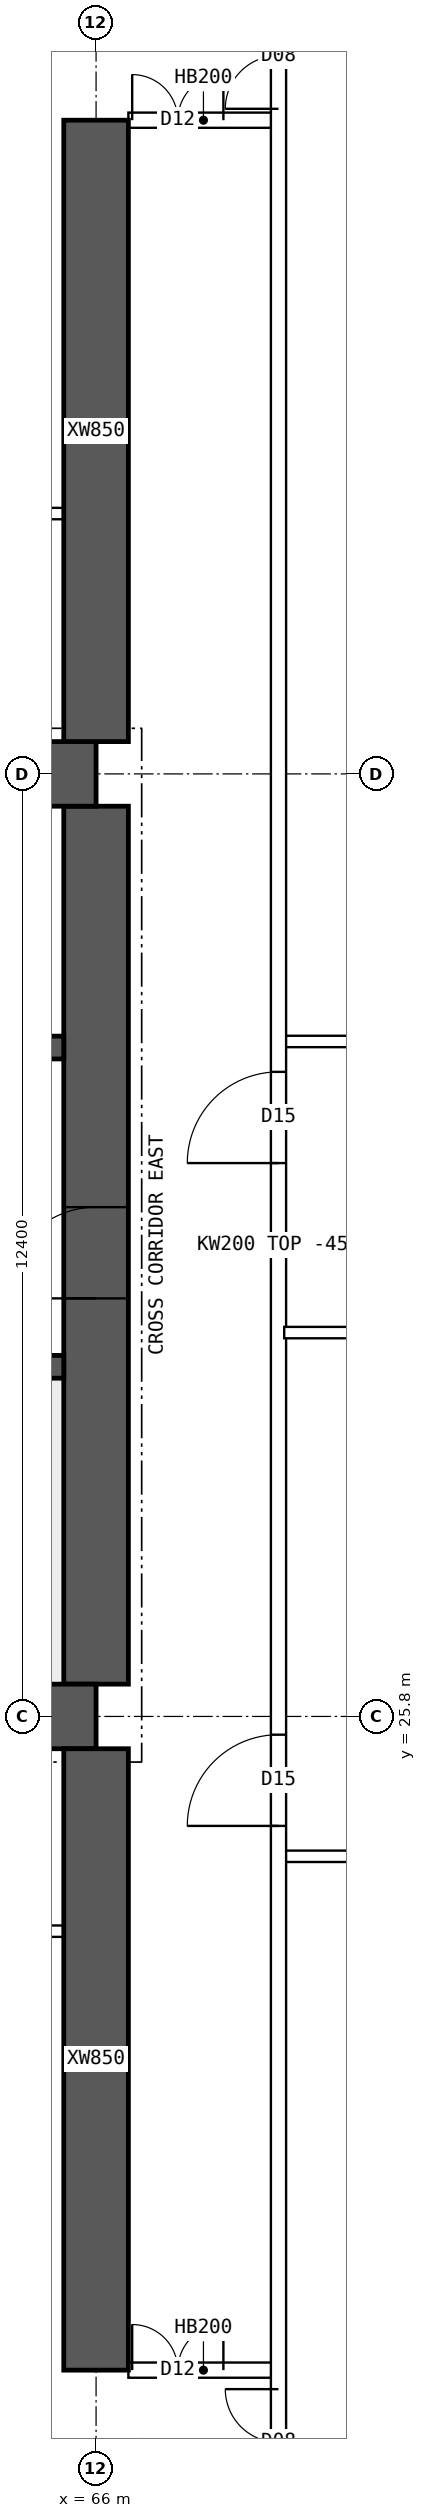
"""IFC4 building model, lengths in metres.
Left out: names, types, materials, properties, quantities, classifications, styles, units other than length and angle.
Written with IfcOpenShell. Run it as: python <this file> out.ifc"""

import sys

from ifc_helpers import new_model, si_unit, direction, frame, frame_2d, origin, place, context, subcontext, project, spatial, polyline, rectangle, outline, extrude, element, fill, save


model = new_model("IFC4")
c1 = context("Model", 3, precision=1e-05, world=origin(), true_north=direction((0.0, 1.0)))
c2 = subcontext(c1, "Body", "Model", "MODEL_VIEW")
j1 = project(units=[si_unit("LENGTHUNIT", "METRE"), si_unit("PLANEANGLEUNIT", "RADIAN")], contexts=[c1])
p1 = place(None, origin())
s1 = spatial("IfcSite", under=j1, at=p1, CompositionType="ELEMENT")
p2 = place(p1, origin())
s2 = spatial("IfcBuilding", under=s1, at=p2, CompositionType="ELEMENT")
p3 = place(p2, frame((0.0, 0.0, 159.85)))
s3 = spatial("IfcBuildingStorey", under=s2, at=p3, CompositionType="ELEMENT", Elevation=159.85)
for number, where, z_axis, x_axis in (
    (1, (18.0, 25.8, 0.0), (0.0, 0.0, 1.0), (1.0, 0.0, 0.0)),
    (2, (18.0, 38.2, 0.0), (0.0, 0.0, 1.0), (1.0, 0.0, 0.0)),
):
    element("IfcWall", number, at=place(p3, frame(where, z_axis=z_axis, x_axis=x_axis)), inside=s3, PredefinedType="SHEAR", context=c2, shape_type="SweptSolid", body=[
        extrude(rectangle(XDim=48.0, YDim=0.85, at=frame_2d((24.0, 0.0))), origin(), (0.0, 0.0, 1.0), 3.75),
    ])
p4 = place(p3, frame((66.0, 26.225, 0.0), z_axis=(0.0, 0.0, 1.0), x_axis=(0.0, 1.0, 0.0)))
e3 = element("IfcWall", 3, at=p4, inside=s3, PredefinedType="SHEAR", context=c2, shape_type="SweptSolid", body=[
    extrude(rectangle(XDim=11.55, YDim=0.85, at=frame_2d((5.775, 0.0))), origin(), (0.0, 0.0, 1.0), 3.75),
])
p5 = place(p4, frame((5.075, 0.0, 0.0)))
e4 = element("IfcOpeningElement", 4, at=p5, cuts=e3, PredefinedType="OPENING", context=c2, shape_type="SweptSolid", body=[
    extrude(rectangle(XDim=1.2, YDim=2.1, at=frame_2d((0.6, 1.05))), frame((0.0, 0.435, 0.0), z_axis=(0.0, -1.0, 0.0), x_axis=(1.0, 0.0, 0.0)), (0.0, 0.0, 1.0), 0.87),
])
p6 = place(p3, frame((18.425, 30.4, 0.0), z_axis=(0.0, 0.0, 1.0), x_axis=(1.0, 0.0, 0.0)))
e5 = element("IfcWall", 5, at=p6, inside=s3, PredefinedType="SHEAR", context=c2, shape_type="SweptSolid", body=[
    extrude(rectangle(XDim=47.15, YDim=0.3, at=frame_2d((23.575, 0.0))), origin(), (0.0, 0.0, 1.0), 3.75),
])
p7 = place(p6, frame((0.4, 0.0, 0.0)))
e6 = element("IfcOpeningElement", 6, at=p7, cuts=e5, PredefinedType="OPENING", context=c2, shape_type="SweptSolid", body=[
    extrude(rectangle(XDim=1.0, YDim=2.1, at=frame_2d((0.5, 1.05))), frame((0.0, 0.16, 0.0), z_axis=(0.0, -1.0, 0.0), x_axis=(1.0, 0.0, 0.0)), (0.0, 0.0, 1.0), 0.32),
])
p8 = place(p6, frame((45.75, 0.0, 0.0)))
e7 = element("IfcOpeningElement", 7, at=p8, cuts=e5, PredefinedType="OPENING", context=c2, shape_type="SweptSolid", body=[
    extrude(rectangle(XDim=1.0, YDim=2.1, at=frame_2d((0.5, 1.05))), frame((0.0, 0.16, 0.0), z_axis=(0.0, -1.0, 0.0), x_axis=(1.0, 0.0, 0.0)), (0.0, 0.0, 1.0), 0.32),
])
p9 = place(p6, frame((8.325, 0.0, 0.0)))
e8 = element("IfcOpeningElement", 8, at=p9, cuts=e5, PredefinedType="OPENING", context=c2, shape_type="SweptSolid", body=[
    extrude(rectangle(XDim=1.1, YDim=2.1, at=frame_2d((0.55, 1.05))), frame((0.0, 0.16, 0.0), z_axis=(0.0, -1.0, 0.0), x_axis=(1.0, 0.0, 0.0)), (0.0, 0.0, 1.0), 0.32),
])
p10 = place(p6, frame((10.925, 0.0, 0.0)))
e9 = element("IfcOpeningElement", 9, at=p10, cuts=e5, PredefinedType="OPENING", context=c2, shape_type="SweptSolid", body=[
    extrude(rectangle(XDim=1.1, YDim=2.1, at=frame_2d((0.55, 1.05))), frame((0.0, 0.16, 0.0), z_axis=(0.0, -1.0, 0.0), x_axis=(1.0, 0.0, 0.0)), (0.0, 0.0, 1.0), 0.32),
])
p11 = place(p6, frame((13.525, 0.0, 0.0)))
e10 = element("IfcOpeningElement", 10, at=p11, cuts=e5, PredefinedType="OPENING", context=c2, shape_type="SweptSolid", body=[
    extrude(rectangle(XDim=1.1, YDim=2.1, at=frame_2d((0.55, 1.05))), frame((0.0, 0.16, 0.0), z_axis=(0.0, -1.0, 0.0), x_axis=(1.0, 0.0, 0.0)), (0.0, 0.0, 1.0), 0.32),
])
p12 = place(p6, frame((16.125, 0.0, 0.0)))
e11 = element("IfcOpeningElement", 11, at=p12, cuts=e5, PredefinedType="OPENING", context=c2, shape_type="SweptSolid", body=[
    extrude(rectangle(XDim=1.1, YDim=2.1, at=frame_2d((0.55, 1.05))), frame((0.0, 0.16, 0.0), z_axis=(0.0, -1.0, 0.0), x_axis=(1.0, 0.0, 0.0)), (0.0, 0.0, 1.0), 0.32),
])
p13 = place(p6, frame((18.9, 0.0, 0.0)))
e12 = element("IfcOpeningElement", 12, at=p13, cuts=e5, PredefinedType="OPENING", context=c2, shape_type="SweptSolid", body=[
    extrude(rectangle(XDim=0.9, YDim=2.1, at=frame_2d((0.45, 1.05))), frame((0.0, 0.16, 0.0), z_axis=(0.0, -1.0, 0.0), x_axis=(1.0, 0.0, 0.0)), (0.0, 0.0, 1.0), 0.32),
])
p14 = place(p6, frame((30.192, 0.0, 0.0)))
e13 = element("IfcOpeningElement", 13, at=p14, cuts=e5, PredefinedType="OPENING", context=c2, shape_type="SweptSolid", body=[
    extrude(rectangle(XDim=1.1, YDim=2.1, at=frame_2d((0.55, 1.05))), frame((0.0, 0.16, 0.0), z_axis=(0.0, -1.0, 0.0), x_axis=(1.0, 0.0, 0.0)), (0.0, 0.0, 1.0), 0.32),
])
p15 = place(p6, frame((33.725, 0.0, 0.0)))
e14 = element("IfcOpeningElement", 14, at=p15, cuts=e5, PredefinedType="OPENING", context=c2, shape_type="SweptSolid", body=[
    extrude(rectangle(XDim=1.1, YDim=2.1, at=frame_2d((0.55, 1.05))), frame((0.0, 0.16, 0.0), z_axis=(0.0, -1.0, 0.0), x_axis=(1.0, 0.0, 0.0)), (0.0, 0.0, 1.0), 0.32),
])
p16 = place(p6, frame((37.258, 0.0, 0.0)))
e15 = element("IfcOpeningElement", 15, at=p16, cuts=e5, PredefinedType="OPENING", context=c2, shape_type="SweptSolid", body=[
    extrude(rectangle(XDim=1.1, YDim=2.1, at=frame_2d((0.55, 1.05))), frame((0.0, 0.16, 0.0), z_axis=(0.0, -1.0, 0.0), x_axis=(1.0, 0.0, 0.0)), (0.0, 0.0, 1.0), 0.32),
])
p17 = place(p3, frame((18.425, 34.6, 0.0), z_axis=(0.0, 0.0, 1.0), x_axis=(1.0, 0.0, 0.0)))
e16 = element("IfcWall", 16, at=p17, inside=s3, PredefinedType="SHEAR", context=c2, shape_type="SweptSolid", body=[
    extrude(rectangle(XDim=47.15, YDim=0.3, at=frame_2d((23.575, 0.0))), origin(), (0.0, 0.0, 1.0), 3.75),
])
p18 = place(p17, frame((0.9, 0.0, 0.0)))
e17 = element("IfcOpeningElement", 17, at=p18, cuts=e16, PredefinedType="OPENING", context=c2, shape_type="SweptSolid", body=[
    extrude(rectangle(XDim=1.1, YDim=2.1, at=frame_2d((0.55, 1.05))), frame((0.0, 0.16, 0.0), z_axis=(0.0, -1.0, 0.0), x_axis=(1.0, 0.0, 0.0)), (0.0, 0.0, 1.0), 0.32),
])
p19 = place(p17, frame((45.15, 0.0, 0.0)))
e18 = element("IfcOpeningElement", 18, at=p19, cuts=e16, PredefinedType="OPENING", context=c2, shape_type="SweptSolid", body=[
    extrude(rectangle(XDim=1.1, YDim=2.1, at=frame_2d((0.55, 1.05))), frame((0.0, 0.16, 0.0), z_axis=(0.0, -1.0, 0.0), x_axis=(1.0, 0.0, 0.0)), (0.0, 0.0, 1.0), 0.32),
])
p20 = place(p17, frame((4.175, 0.0, 0.0)))
e19 = element("IfcOpeningElement", 19, at=p20, cuts=e16, PredefinedType="OPENING", context=c2, shape_type="SweptSolid", body=[
    extrude(rectangle(XDim=0.9, YDim=2.1, at=frame_2d((0.45, 1.05))), frame((0.0, 0.16, 0.0), z_axis=(0.0, -1.0, 0.0), x_axis=(1.0, 0.0, 0.0)), (0.0, 0.0, 1.0), 0.32),
])
p21 = place(p17, frame((42.075, 0.0, 0.0)))
e20 = element("IfcOpeningElement", 20, at=p21, cuts=e16, PredefinedType="OPENING", context=c2, shape_type="SweptSolid", body=[
    extrude(rectangle(XDim=0.9, YDim=2.1, at=frame_2d((0.45, 1.05))), frame((0.0, 0.16, 0.0), z_axis=(0.0, -1.0, 0.0), x_axis=(1.0, 0.0, 0.0)), (0.0, 0.0, 1.0), 0.32),
])
p22 = place(p17, frame((8.95, 0.0, 0.0)))
e21 = element("IfcOpeningElement", 21, at=p22, cuts=e16, PredefinedType="OPENING", context=c2, shape_type="SweptSolid", body=[
    extrude(rectangle(XDim=0.9, YDim=2.1, at=frame_2d((0.45, 1.05))), frame((0.0, 0.16, 0.0), z_axis=(0.0, -1.0, 0.0), x_axis=(1.0, 0.0, 0.0)), (0.0, 0.0, 1.0), 0.32),
])
p23 = place(p17, frame((12.924, 0.0, 0.0)))
e22 = element("IfcOpeningElement", 22, at=p23, cuts=e16, PredefinedType="OPENING", context=c2, shape_type="SweptSolid", body=[
    extrude(rectangle(XDim=0.9, YDim=2.1, at=frame_2d((0.45, 1.05))), frame((0.0, 0.16, 0.0), z_axis=(0.0, -1.0, 0.0), x_axis=(1.0, 0.0, 0.0)), (0.0, 0.0, 1.0), 0.32),
])
p24 = place(p17, frame((16.571, 0.0, 0.0)))
e23 = element("IfcOpeningElement", 23, at=p24, cuts=e16, PredefinedType="OPENING", context=c2, shape_type="SweptSolid", body=[
    extrude(rectangle(XDim=0.9, YDim=2.1, at=frame_2d((0.45, 1.05))), frame((0.0, 0.16, 0.0), z_axis=(0.0, -1.0, 0.0), x_axis=(1.0, 0.0, 0.0)), (0.0, 0.0, 1.0), 0.32),
])
p25 = place(p17, frame((20.33, 0.0, 0.0)))
e24 = element("IfcOpeningElement", 24, at=p25, cuts=e16, PredefinedType="OPENING", context=c2, shape_type="SweptSolid", body=[
    extrude(rectangle(XDim=0.9, YDim=2.1, at=frame_2d((0.45, 1.05))), frame((0.0, 0.16, 0.0), z_axis=(0.0, -1.0, 0.0), x_axis=(1.0, 0.0, 0.0)), (0.0, 0.0, 1.0), 0.32),
])
p26 = place(p17, frame((24.736, 0.0, 0.0)))
e25 = element("IfcOpeningElement", 25, at=p26, cuts=e16, PredefinedType="OPENING", context=c2, shape_type="SweptSolid", body=[
    extrude(rectangle(XDim=0.9, YDim=2.1, at=frame_2d((0.45, 1.05))), frame((0.0, 0.16, 0.0), z_axis=(0.0, -1.0, 0.0), x_axis=(1.0, 0.0, 0.0)), (0.0, 0.0, 1.0), 0.32),
])
p27 = place(p17, frame((27.533, 0.0, 0.0)))
e26 = element("IfcOpeningElement", 26, at=p27, cuts=e16, PredefinedType="OPENING", context=c2, shape_type="SweptSolid", body=[
    extrude(rectangle(XDim=0.9, YDim=2.1, at=frame_2d((0.45, 1.05))), frame((0.0, 0.16, 0.0), z_axis=(0.0, -1.0, 0.0), x_axis=(1.0, 0.0, 0.0)), (0.0, 0.0, 1.0), 0.32),
])
p28 = place(p17, frame((29.906, 0.0, 0.0)))
e27 = element("IfcOpeningElement", 27, at=p28, cuts=e16, PredefinedType="OPENING", context=c2, shape_type="SweptSolid", body=[
    extrude(rectangle(XDim=0.9, YDim=2.1, at=frame_2d((0.45, 1.05))), frame((0.0, 0.16, 0.0), z_axis=(0.0, -1.0, 0.0), x_axis=(1.0, 0.0, 0.0)), (0.0, 0.0, 1.0), 0.32),
])
p29 = place(p17, frame((35.376, 0.0, 0.0)))
e28 = element("IfcOpeningElement", 28, at=p29, cuts=e16, PredefinedType="OPENING", context=c2, shape_type="SweptSolid", body=[
    extrude(rectangle(XDim=0.9, YDim=2.1, at=frame_2d((0.45, 1.05))), frame((0.0, 0.16, 0.0), z_axis=(0.0, -1.0, 0.0), x_axis=(1.0, 0.0, 0.0)), (0.0, 0.0, 1.0), 0.32),
])
for number, where, z_axis, x_axis in (
    (29, (66.0, 17.2, 0.0), (0.0, 0.0, 1.0), (0.0, 1.0, 0.0)),
    (30, (66.0, 38.625, 0.0), (0.0, 0.0, 1.0), (0.0, 1.0, 0.0)),
):
    element("IfcWall", number, at=place(p3, frame(where, z_axis=z_axis, x_axis=x_axis)), inside=s3, PredefinedType="SHEAR", context=c2, shape_type="SweptSolid", body=[
        extrude(rectangle(XDim=8.175, YDim=0.85, at=frame_2d((4.087, 0.0))), origin(), (0.0, 0.0, 1.0), 3.75),
    ])
p30 = place(p3, frame((66.425, 17.2, 0.0), z_axis=(0.0, 0.0, 1.0), x_axis=(1.0, 0.0, 0.0)))
e31 = element("IfcWall", 31, at=p30, inside=s3, PredefinedType="SOLIDWALL", context=c2, shape_type="SweptSolid", body=[
    extrude(rectangle(XDim=1.975, YDim=0.2, at=frame_2d((0.987, 0.0))), origin(), (0.0, 0.0, 1.0), 3.3),
])
p31 = place(p30, frame((0.05, 0.0, 0.0)))
e32 = element("IfcOpeningElement", 32, at=p31, cuts=e31, PredefinedType="OPENING", context=c2, shape_type="SweptSolid", body=[
    extrude(rectangle(XDim=1.2, YDim=2.1, at=frame_2d((0.6, 1.05))), frame((0.0, 0.11, 0.0), z_axis=(0.0, -1.0, 0.0), x_axis=(1.0, 0.0, 0.0)), (0.0, 0.0, 1.0), 0.22),
])
p32 = place(p3, frame((66.425, 46.8, 0.0), z_axis=(0.0, 0.0, 1.0), x_axis=(1.0, 0.0, 0.0)))
e33 = element("IfcWall", 33, at=p32, inside=s3, PredefinedType="SOLIDWALL", context=c2, shape_type="SweptSolid", body=[
    extrude(rectangle(XDim=1.975, YDim=0.2, at=frame_2d((0.987, 0.0))), origin(), (0.0, 0.0, 1.0), 3.3),
])
p33 = place(p32, frame((0.05, 0.0, 0.0)))
e34 = element("IfcOpeningElement", 34, at=p33, cuts=e33, PredefinedType="OPENING", context=c2, shape_type="SweptSolid", body=[
    extrude(rectangle(XDim=1.2, YDim=2.1, at=frame_2d((0.6, 1.05))), frame((0.0, 0.11, 0.0), z_axis=(0.0, -1.0, 0.0), x_axis=(1.0, 0.0, 0.0)), (0.0, 0.0, 1.0), 0.22),
])
p34 = place(p3, frame((60.075, 22.975, 0.0), z_axis=(0.0, 0.0, 1.0), x_axis=(1.0, 0.0, 0.0)))
e35 = element("IfcWall", 35, at=p34, inside=s3, PredefinedType="PARTITIONING", context=c2, shape_type="SweptSolid", body=[
    extrude(rectangle(XDim=5.5, YDim=0.15, at=frame_2d((2.75, 0.0))), origin(), (0.0, 0.0, 1.0), 3.3),
])
p35 = place(p34, frame((0.4, 0.0, 0.0)))
e36 = element("IfcOpeningElement", 36, at=p35, cuts=e35, PredefinedType="OPENING", context=c2, shape_type="SweptSolid", body=[
    extrude(rectangle(XDim=1.0, YDim=2.1, at=frame_2d((0.5, 1.05))), frame((0.0, 0.085, 0.0), z_axis=(0.0, -1.0, 0.0), x_axis=(1.0, 0.0, 0.0)), (0.0, 0.0, 1.0), 0.17),
])
p36 = place(p3, frame((65.575, 41.625, 0.0), z_axis=(0.0, 0.0, 1.0), x_axis=(-1.0, 0.0, 0.0)))
e37 = element("IfcWall", 37, at=p36, inside=s3, PredefinedType="PARTITIONING", context=c2, shape_type="SweptSolid", body=[
    extrude(rectangle(XDim=5.5, YDim=0.15, at=frame_2d((2.75, 0.0))), origin(), (0.0, 0.0, 1.0), 3.3),
])
p37 = place(p36, frame((0.4, 0.0, 0.0)))
e38 = element("IfcOpeningElement", 38, at=p37, cuts=e37, PredefinedType="OPENING", context=c2, shape_type="SweptSolid", body=[
    extrude(rectangle(XDim=1.0, YDim=2.1, at=frame_2d((0.5, 1.05))), frame((0.0, 0.085, 0.0), z_axis=(0.0, -1.0, 0.0), x_axis=(1.0, 0.0, 0.0)), (0.0, 0.0, 1.0), 0.17),
])
p38 = place(p3, frame((68.475, 30.85, 0.0), z_axis=(0.0, 0.0, 1.0), x_axis=(1.0, 0.0, 0.0)))
e39 = element("IfcWall", 39, at=p38, inside=s3, PredefinedType="PARTITIONING", context=c2, shape_type="SweptSolid", body=[
    extrude(outline(polyline([(0.0, 0.0), (6.82, 0.0), (6.82, 3.3), (3.827, 3.3), (3.825, 2.85), (3.227, 2.85), (3.225, 3.3), (0.0, 3.3), (0.0, 0.0)])), frame((0.0, 0.075, 0.0), z_axis=(0.0, -1.0, 0.0), x_axis=(1.0, 0.0, 0.0)), (0.0, 0.0, 1.0), 0.15),
])
p39 = place(p3, frame((68.4, 10.446, 0.0), z_axis=(0.0, 0.0, 1.0), x_axis=(0.0, 1.0, 0.0)))
e40 = element("IfcWall", 40, at=p39, inside=s3, PredefinedType="SOLIDWALL", context=c2, shape_type="SweptSolid", body=[
    extrude(rectangle(XDim=43.107, YDim=0.2, at=frame_2d((21.554, 0.0))), origin(), (0.0, 0.0, 1.0), 3.3),
])
p40 = place(p39, frame((13.914, 0.0, 0.0)))
e41 = element("IfcOpeningElement", 41, at=p40, cuts=e40, PredefinedType="OPENING", context=c2, shape_type="SweptSolid", body=[
    extrude(rectangle(XDim=1.2, YDim=2.1, at=frame_2d((0.6, 1.05))), frame((0.0, 0.11, 0.0), z_axis=(0.0, -1.0, 0.0), x_axis=(1.0, 0.0, 0.0)), (0.0, 0.0, 1.0), 0.22),
])
p41 = place(p39, frame((22.634, 0.0, 0.0)))
e42 = element("IfcOpeningElement", 42, at=p41, cuts=e40, PredefinedType="OPENING", context=c2, shape_type="SweptSolid", body=[
    extrude(rectangle(XDim=1.2, YDim=2.1, at=frame_2d((0.6, 1.05))), frame((0.0, 0.11, 0.0), z_axis=(0.0, -1.0, 0.0), x_axis=(1.0, 0.0, 0.0)), (0.0, 0.0, 1.0), 0.22),
])
p42 = place(p39, frame((5.104, 0.0, 0.0)))
e43 = element("IfcOpeningElement", 43, at=p42, cuts=e40, PredefinedType="OPENING", context=c2, shape_type="SweptSolid", body=[
    extrude(rectangle(XDim=1.4, YDim=2.1, at=frame_2d((0.7, 1.05))), frame((0.0, 0.11, 0.0), z_axis=(0.0, -1.0, 0.0), x_axis=(1.0, 0.0, 0.0)), (0.0, 0.0, 1.0), 0.22),
])
p43 = place(p39, frame((36.504, 0.0, 0.0)))
e44 = element("IfcOpeningElement", 44, at=p43, cuts=e40, PredefinedType="OPENING", context=c2, shape_type="SweptSolid", body=[
    extrude(rectangle(XDim=1.4, YDim=2.1, at=frame_2d((0.7, 1.05))), frame((0.0, 0.11, 0.0), z_axis=(0.0, -1.0, 0.0), x_axis=(1.0, 0.0, 0.0)), (0.0, 0.0, 1.0), 0.22),
])
p44 = place(p3, frame((68.475, 23.96, 0.0), z_axis=(0.0, 0.0, 1.0), x_axis=(1.0, 0.0, 0.0)))
e45 = element("IfcWall", 45, at=p44, inside=s3, PredefinedType="PARTITIONING", context=c2, shape_type="SweptSolid", body=[
    extrude(rectangle(XDim=6.82, YDim=0.15, at=frame_2d((3.41, 0.0))), origin(), (0.0, 0.0, 1.0), 3.3),
])
p45 = place(p3, frame((68.475, 34.68, 0.0), z_axis=(0.0, 0.0, 1.0), x_axis=(1.0, 0.0, 0.0)))
e46 = element("IfcWall", 46, at=p45, inside=s3, PredefinedType="PARTITIONING", context=c2, shape_type="SweptSolid", body=[
    extrude(outline(polyline([(0.0, 0.0), (6.82, 0.0), (6.82, 3.3), (3.827, 3.3), (3.825, 2.85), (3.227, 2.85), (3.225, 3.3), (0.0, 3.3), (0.0, 0.0)])), frame((0.0, 0.075, 0.0), z_axis=(0.0, -1.0, 0.0), x_axis=(1.0, 0.0, 0.0)), (0.0, 0.0, 1.0), 0.15),
])
p46 = place(p5, origin())
e47 = element("IfcDoor", 47, at=p46, inside=s3, OperationType="SINGLE_SWING_LEFT", PredefinedType="DOOR", context=c2, shape_type="SweptSolid", body=[
    extrude(rectangle(XDim=1.2, YDim=2.1, at=frame_2d((0.6, 1.05))), frame((0.0, 0.025, 0.0), z_axis=(0.0, -1.0, 0.0), x_axis=(1.0, 0.0, 0.0)), (0.0, 0.0, 1.0), 0.05),
])
fill(e4, e47)
p47 = place(p31, origin())
e48 = element("IfcDoor", 48, at=p47, inside=s3, OperationType="DOUBLE_DOOR_SINGLE_SWING", PredefinedType="DOOR", context=c2, shape_type="SweptSolid", body=[
    extrude(rectangle(XDim=1.2, YDim=2.1, at=frame_2d((0.6, 1.05))), frame((0.0, 0.025, 0.0), z_axis=(0.0, -1.0, 0.0), x_axis=(1.0, 0.0, 0.0)), (0.0, 0.0, 1.0), 0.05),
])
fill(e32, e48)
p48 = place(p33, origin())
e49 = element("IfcDoor", 49, at=p48, inside=s3, OperationType="DOUBLE_DOOR_SINGLE_SWING", PredefinedType="DOOR", context=c2, shape_type="SweptSolid", body=[
    extrude(rectangle(XDim=1.2, YDim=2.1, at=frame_2d((0.6, 1.05))), frame((0.0, 0.025, 0.0), z_axis=(0.0, -1.0, 0.0), x_axis=(1.0, 0.0, 0.0)), (0.0, 0.0, 1.0), 0.05),
])
fill(e34, e49)
p49 = place(p40, origin())
e50 = element("IfcDoor", 50, at=p49, inside=s3, OperationType="SINGLE_SWING_LEFT", PredefinedType="DOOR", context=c2, shape_type="SweptSolid", body=[
    extrude(rectangle(XDim=1.2, YDim=2.1, at=frame_2d((0.6, 1.05))), frame((0.0, 0.025, 0.0), z_axis=(0.0, -1.0, 0.0), x_axis=(1.0, 0.0, 0.0)), (0.0, 0.0, 1.0), 0.05),
])
fill(e41, e50)
p50 = place(p41, origin())
e51 = element("IfcDoor", 51, at=p50, inside=s3, OperationType="SINGLE_SWING_LEFT", PredefinedType="DOOR", context=c2, shape_type="SweptSolid", body=[
    extrude(rectangle(XDim=1.2, YDim=2.1, at=frame_2d((0.6, 1.05))), frame((0.0, 0.025, 0.0), z_axis=(0.0, -1.0, 0.0), x_axis=(1.0, 0.0, 0.0)), (0.0, 0.0, 1.0), 0.05),
])
fill(e42, e51)
p51 = place(p42, origin())
e52 = element("IfcDoor", 52, at=p51, inside=s3, OperationType="DOUBLE_DOOR_SINGLE_SWING", PredefinedType="DOOR", context=c2, shape_type="SweptSolid", body=[
    extrude(rectangle(XDim=1.4, YDim=2.1, at=frame_2d((0.7, 1.05))), frame((0.0, 0.025, 0.0), z_axis=(0.0, -1.0, 0.0), x_axis=(1.0, 0.0, 0.0)), (0.0, 0.0, 1.0), 0.05),
])
fill(e43, e52)
p52 = place(p43, origin())
e53 = element("IfcDoor", 53, at=p52, inside=s3, OperationType="DOUBLE_DOOR_SINGLE_SWING", PredefinedType="DOOR", context=c2, shape_type="SweptSolid", body=[
    extrude(rectangle(XDim=1.4, YDim=2.1, at=frame_2d((0.7, 1.05))), frame((0.0, 0.025, 0.0), z_axis=(0.0, -1.0, 0.0), x_axis=(1.0, 0.0, 0.0)), (0.0, 0.0, 1.0), 0.05),
])
fill(e44, e53)
save(model, sys.argv[1])
